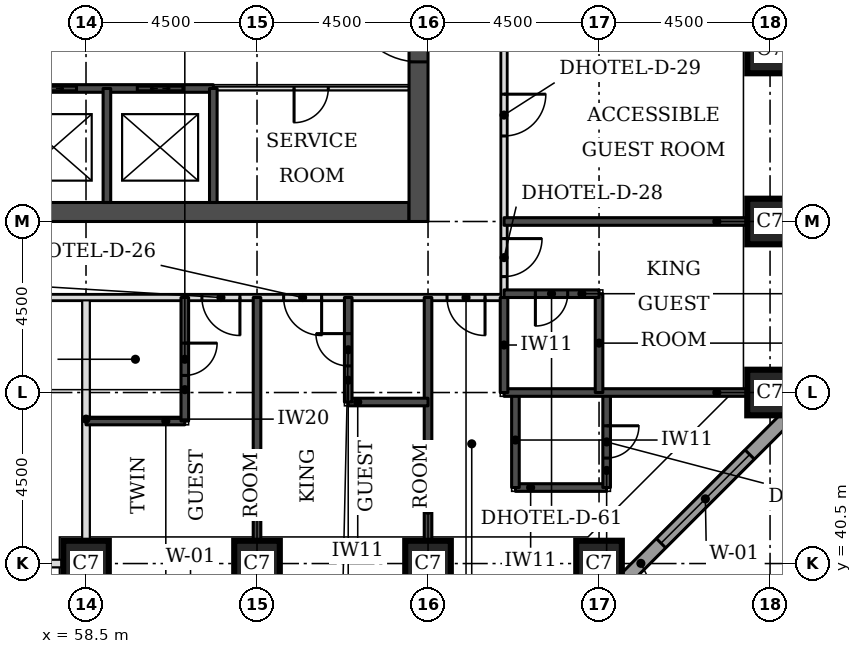
"""IFC4 building model, lengths in metres.
Left out: names, types, materials, properties, quantities, classifications, styles, units other than length and angle.
Written with IfcOpenShell. Run it as: python <this file> out.ifc"""

import sys

from ifc_helpers import new_model, si_unit, direction, frame, frame_2d, origin, origin_2d, place, context, subcontext, project, spatial, rectangle, extrude, element, fill, save


model = new_model("IFC4")
c1 = context("Model", 3, precision=1e-05, world=origin(), true_north=direction((0.0, 1.0)))
c2 = subcontext(c1, "Body", "Model", "MODEL_VIEW")
j1 = project(units=[si_unit("LENGTHUNIT", "METRE"), si_unit("PLANEANGLEUNIT", "RADIAN")], contexts=[c1])
p1 = place(None, origin())
s1 = spatial("IfcSite", under=j1, at=p1, CompositionType="ELEMENT")
p2 = place(p1, origin())
s2 = spatial("IfcBuilding", under=s1, at=p2, CompositionType="ELEMENT")
p3 = place(p2, frame((0.0, 0.0, 36.3)))
s3 = spatial("IfcBuildingStorey", under=s2, at=p3, CompositionType="ELEMENT", Elevation=36.3)
for number, where, z_axis, x_axis in (
    (1, (58.5, 40.5, 0.0), (0.0, 0.0, 1.0), (1.0, 0.0, 0.0)),
    (2, (63.0, 40.5, 0.0), (0.0, 0.0, 1.0), (1.0, 0.0, 0.0)),
    (3, (67.5, 40.5, 0.0), (0.0, 0.0, 1.0), (1.0, 0.0, 0.0)),
    (4, (72.0, 40.5, 0.0), (0.0, 0.0, 1.0), (1.0, 0.0, 0.0)),
    (5, (76.5, 45.0, 0.0), (0.0, 0.0, 1.0), (1.0, 0.0, 0.0)),
    (6, (76.5, 49.5, 0.0), (0.0, 0.0, 1.0), (1.0, 0.0, 0.0)),
    (7, (76.5, 54.0, 0.0), (0.0, 0.0, 1.0), (1.0, 0.0, 0.0)),
):
    element("IfcColumn", number, at=place(p3, frame(where, z_axis=z_axis, x_axis=x_axis)), inside=s3, PredefinedType="COLUMN", context=c2, shape_type="SweptSolid", body=[
        extrude(rectangle(XDim=1.2, YDim=1.2, at=origin_2d()), origin(), (0.0, 0.0, 1.0), 3.3),
    ])
p4 = place(p3, frame((45.5, 49.75, 0.0), z_axis=(0.0, 0.0, 1.0), x_axis=(1.0, 0.0, 0.0)))
e8 = element("IfcWall", 8, at=p4, inside=s3, PredefinedType="SHEAR", context=c2, shape_type="SweptSolid", body=[
    extrude(rectangle(XDim=21.5, YDim=0.5, at=frame_2d((10.75, 0.0))), origin(), (0.0, 0.0, 1.0), 3.3),
])
p5 = place(p3, frame((67.25, 49.5, 0.0), z_axis=(0.0, 0.0, 1.0), x_axis=(0.0, 1.0, 0.0)))
e9 = element("IfcWall", 9, at=p5, inside=s3, PredefinedType="SHEAR", context=c2, shape_type="SweptSolid", body=[
    extrude(rectangle(XDim=22.5, YDim=0.5, at=frame_2d((11.25, 0.0))), origin(), (0.0, 0.0, 1.0), 3.3),
])
p6 = place(p5, frame((4.2, 0.0, 0.0)))
e10 = element("IfcOpeningElement", 10, at=p6, cuts=e9, PredefinedType="OPENING", context=c2, shape_type="SweptSolid", body=[
    extrude(rectangle(XDim=1.8, YDim=2.1, at=frame_2d((0.9, 1.05))), frame((0.0, 0.26, 0.0), z_axis=(0.0, -1.0, 0.0), x_axis=(1.0, 0.0, 0.0)), (0.0, 0.0, 1.0), 0.52),
])
p7 = place(p5, frame((6.9, 0.0, 0.0)))
e11 = element("IfcOpeningElement", 11, at=p7, cuts=e9, PredefinedType="OPENING", context=c2, shape_type="SweptSolid", body=[
    extrude(rectangle(XDim=1.1, YDim=2.1, at=frame_2d((0.55, 1.05))), frame((0.0, 0.26, 0.0), z_axis=(0.0, -1.0, 0.0), x_axis=(1.0, 0.0, 0.0)), (0.0, 0.0, 1.0), 0.52),
])
p8 = place(p5, frame((13.6, 0.0, 0.0)))
e12 = element("IfcOpeningElement", 12, at=p8, cuts=e9, PredefinedType="OPENING", context=c2, shape_type="SweptSolid", body=[
    extrude(rectangle(XDim=1.1, YDim=2.1, at=frame_2d((0.55, 1.05))), frame((0.0, 0.26, 0.0), z_axis=(0.0, -1.0, 0.0), x_axis=(1.0, 0.0, 0.0)), (0.0, 0.0, 1.0), 0.52),
])
p9 = place(p5, frame((16.5, 0.0, 0.0)))
e13 = element("IfcOpeningElement", 13, at=p9, cuts=e9, PredefinedType="OPENING", context=c2, shape_type="SweptSolid", body=[
    extrude(rectangle(XDim=1.8, YDim=2.1, at=frame_2d((0.9, 1.05))), frame((0.0, 0.26, 0.0), z_axis=(0.0, -1.0, 0.0), x_axis=(1.0, 0.0, 0.0)), (0.0, 0.0, 1.0), 0.52),
])
p10 = place(p3, frame((72.27, 39.674, 0.0), z_axis=(0.0, 0.0, 1.0), x_axis=(0.707106781187, 0.707106781187, 0.0)))
e14 = element("IfcWall", 14, at=p10, inside=s3, PredefinedType="STANDARD", context=c2, shape_type="SweptSolid", body=[
    extrude(rectangle(XDim=7.151, YDim=0.35, at=frame_2d((3.576, 0.0))), origin(), (0.0, 0.0, 1.0), 3.055),
])
p11 = place(p10, frame((1.926, 0.0, 0.8)))
e15 = element("IfcOpeningElement", 15, at=p11, cuts=e14, PredefinedType="OPENING", context=c2, shape_type="SweptSolid", body=[
    extrude(rectangle(XDim=3.3, YDim=1.5, at=frame_2d((1.65, 0.75))), frame((0.0, 0.185, 0.0), z_axis=(0.0, -1.0, 0.0), x_axis=(1.0, 0.0, 0.0)), (0.0, 0.0, 1.0), 0.37),
])
p12 = place(p3, frame((51.5, 40.5, 0.0), z_axis=(0.0, 0.0, 1.0), x_axis=(1.0, 0.0, 0.0)))
e16 = element("IfcWall", 16, at=p12, inside=s3, PredefinedType="PARTITIONING", context=c2, shape_type="SweptSolid", body=[
    extrude(rectangle(XDim=6.4, YDim=0.2, at=frame_2d((3.2, 0.0))), origin(), (0.0, 0.0, 1.0), 2.33),
])
p13 = place(p3, frame((58.5, 41.1, 0.0), z_axis=(0.0, 0.0, 1.0), x_axis=(0.0, 1.0, 0.0)))
e17 = element("IfcWall", 17, at=p13, inside=s3, PredefinedType="PARTITIONING", context=c2, shape_type="SweptSolid", body=[
    extrude(rectangle(XDim=6.4, YDim=0.2, at=frame_2d((3.2, 0.0))), origin(), (0.0, 0.0, 1.0), 3.08),
])
p14 = place(p3, frame((51.5, 47.5, 0.0), z_axis=(0.0, 0.0, 1.0), x_axis=(1.0, 0.0, 0.0)))
e18 = element("IfcWall", 18, at=p14, inside=s3, PredefinedType="PARTITIONING", context=c2, shape_type="SweptSolid", body=[
    extrude(rectangle(XDim=18.0, YDim=0.15, at=frame_2d((9.0, 0.0))), origin(), (0.0, 0.0, 1.0), 3.08),
])
p15 = place(p14, frame((12.2, 0.0, 0.0)))
e19 = element("IfcOpeningElement", 19, at=p15, cuts=e18, PredefinedType="OPENING", context=c2, shape_type="SweptSolid", body=[
    extrude(rectangle(XDim=1.0, YDim=2.1, at=frame_2d((0.5, 1.05))), frame((0.0, 0.085, 0.0), z_axis=(0.0, -1.0, 0.0), x_axis=(1.0, 0.0, 0.0)), (0.0, 0.0, 1.0), 0.17),
])
p16 = place(p14, frame((10.05, 0.0, 0.0)))
e20 = element("IfcOpeningElement", 20, at=p16, cuts=e18, PredefinedType="OPENING", context=c2, shape_type="SweptSolid", body=[
    extrude(rectangle(XDim=1.0, YDim=2.1, at=frame_2d((0.5, 1.05))), frame((0.0, 0.085, 0.0), z_axis=(0.0, -1.0, 0.0), x_axis=(1.0, 0.0, 0.0)), (0.0, 0.0, 1.0), 0.17),
])
p17 = place(p14, frame((16.5, 0.0, 0.0)))
e21 = element("IfcOpeningElement", 21, at=p17, cuts=e18, PredefinedType="OPENING", context=c2, shape_type="SweptSolid", body=[
    extrude(rectangle(XDim=1.0, YDim=2.1, at=frame_2d((0.5, 1.05))), frame((0.0, 0.085, 0.0), z_axis=(0.0, -1.0, 0.0), x_axis=(1.0, 0.0, 0.0)), (0.0, 0.0, 1.0), 0.17),
])
p18 = place(p3, frame((69.5, 47.5, 0.0), z_axis=(0.0, 0.0, 1.0), x_axis=(0.0, 1.0, 0.0)))
e22 = element("IfcWall", 22, at=p18, inside=s3, PredefinedType="PARTITIONING", context=c2, shape_type="SweptSolid", body=[
    extrude(rectangle(XDim=26.5, YDim=0.15, at=frame_2d((13.25, 0.0))), origin(), (0.0, 0.0, 1.0), 3.08),
])
p19 = place(p18, frame((22.65, 0.0, 0.0)))
e23 = element("IfcOpeningElement", 23, at=p19, cuts=e22, PredefinedType="OPENING", context=c2, shape_type="SweptSolid", body=[
    extrude(rectangle(XDim=1.0, YDim=2.1, at=frame_2d((0.5, 1.05))), frame((0.0, 0.085, 0.0), z_axis=(0.0, -1.0, 0.0), x_axis=(1.0, 0.0, 0.0)), (0.0, 0.0, 1.0), 0.17),
])
p20 = place(p18, frame((16.6, 0.0, 0.0)))
e24 = element("IfcOpeningElement", 24, at=p20, cuts=e22, PredefinedType="OPENING", context=c2, shape_type="SweptSolid", body=[
    extrude(rectangle(XDim=1.0, YDim=2.1, at=frame_2d((0.5, 1.05))), frame((0.0, 0.085, 0.0), z_axis=(0.0, -1.0, 0.0), x_axis=(1.0, 0.0, 0.0)), (0.0, 0.0, 1.0), 0.17),
])
p21 = place(p18, frame((4.25, 0.0, 0.0)))
e25 = element("IfcOpeningElement", 25, at=p21, cuts=e22, PredefinedType="OPENING", context=c2, shape_type="SweptSolid", body=[
    extrude(rectangle(XDim=1.1, YDim=2.1, at=frame_2d((0.55, 1.05))), frame((0.0, 0.085, 0.0), z_axis=(0.0, -1.0, 0.0), x_axis=(1.0, 0.0, 0.0)), (0.0, 0.0, 1.0), 0.17),
])
p22 = place(p18, frame((0.55, 0.0, 0.0)))
e26 = element("IfcOpeningElement", 26, at=p22, cuts=e22, PredefinedType="OPENING", context=c2, shape_type="SweptSolid", body=[
    extrude(rectangle(XDim=1.0, YDim=2.1, at=frame_2d((0.5, 1.05))), frame((0.0, 0.085, 0.0), z_axis=(0.0, -1.0, 0.0), x_axis=(1.0, 0.0, 0.0)), (0.0, 0.0, 1.0), 0.17),
])
for number, where, z_axis, x_axis in (
    (27, (63.0, 41.1, 0.0), (0.0, 0.0, 1.0), (0.0, 1.0, 0.0)),
    (28, (67.5, 41.1, 0.0), (0.0, 0.0, 1.0), (0.0, 1.0, 0.0)),
):
    element("IfcWall", number, at=place(p3, frame(where, z_axis=z_axis, x_axis=x_axis)), inside=s3, PredefinedType="SOLIDWALL", context=c2, shape_type="SweptSolid", body=[
        extrude(rectangle(XDim=6.4, YDim=0.2, at=frame_2d((3.2, 0.0))), origin(), (0.0, 0.0, 1.0), 3.08),
    ])
p23 = place(p3, frame((69.8, 42.5, 0.0), z_axis=(0.0, 0.0, 1.0), x_axis=(1.0, 0.0, 0.0)))
e29 = element("IfcWall", 29, at=p23, inside=s3, PredefinedType="SOLIDWALL", context=c2, shape_type="SweptSolid", body=[
    extrude(rectangle(XDim=2.4, YDim=0.2, at=frame_2d((1.2, 0.0))), origin(), (0.0, 0.0, 1.0), 3.08),
])
p24 = place(p3, frame((69.8, 42.5, 0.0), z_axis=(0.0, 0.0, 1.0), x_axis=(0.0, 1.0, 0.0)))
e30 = element("IfcWall", 30, at=p24, inside=s3, PredefinedType="SOLIDWALL", context=c2, shape_type="SweptSolid", body=[
    extrude(rectangle(XDim=2.5, YDim=0.2, at=frame_2d((1.25, 0.0))), origin(), (0.0, 0.0, 1.0), 3.08),
])
p25 = place(p3, frame((72.2, 42.5, 0.0), z_axis=(0.0, 0.0, 1.0), x_axis=(0.0, 1.0, 0.0)))
e31 = element("IfcWall", 31, at=p25, inside=s3, PredefinedType="SOLIDWALL", context=c2, shape_type="SweptSolid", body=[
    extrude(rectangle(XDim=2.5, YDim=0.2, at=frame_2d((1.25, 0.0))), origin(), (0.0, 0.0, 1.0), 3.08),
])
p26 = place(p25, frame((0.775, 0.0, 0.0)))
e32 = element("IfcOpeningElement", 32, at=p26, cuts=e31, PredefinedType="OPENING", context=c2, shape_type="SweptSolid", body=[
    extrude(rectangle(XDim=0.85, YDim=2.1, at=frame_2d((0.425, 1.05))), frame((0.0, 0.11, 0.0), z_axis=(0.0, -1.0, 0.0), x_axis=(1.0, 0.0, 0.0)), (0.0, 0.0, 1.0), 0.22),
])
p27 = place(p3, frame((58.5, 44.25, 0.0), z_axis=(0.0, 0.0, 1.0), x_axis=(1.0, 0.0, 0.0)))
e33 = element("IfcWall", 33, at=p27, inside=s3, PredefinedType="SOLIDWALL", context=c2, shape_type="SweptSolid", body=[
    extrude(rectangle(XDim=2.6, YDim=0.2, at=frame_2d((1.3, 0.0))), origin(), (0.0, 0.0, 1.0), 3.08),
])
p28 = place(p3, frame((61.1, 44.25, 0.0), z_axis=(0.0, 0.0, 1.0), x_axis=(0.0, 1.0, 0.0)))
e34 = element("IfcWall", 34, at=p28, inside=s3, PredefinedType="SOLIDWALL", context=c2, shape_type="SweptSolid", body=[
    extrude(rectangle(XDim=3.25, YDim=0.2, at=frame_2d((1.625, 0.0))), origin(), (0.0, 0.0, 1.0), 3.08),
])
p29 = place(p28, frame((1.2, 0.0, 0.0)))
e35 = element("IfcOpeningElement", 35, at=p29, cuts=e34, PredefinedType="OPENING", context=c2, shape_type="SweptSolid", body=[
    extrude(rectangle(XDim=0.85, YDim=2.1, at=frame_2d((0.425, 1.05))), frame((0.0, 0.11, 0.0), z_axis=(0.0, -1.0, 0.0), x_axis=(1.0, 0.0, 0.0)), (0.0, 0.0, 1.0), 0.22),
])
p30 = place(p3, frame((65.4, 44.75, 0.0), z_axis=(0.0, 0.0, 1.0), x_axis=(1.0, 0.0, 0.0)))
e36 = element("IfcWall", 36, at=p30, inside=s3, PredefinedType="SOLIDWALL", context=c2, shape_type="SweptSolid", body=[
    extrude(rectangle(XDim=2.1, YDim=0.2, at=frame_2d((1.05, 0.0))), origin(), (0.0, 0.0, 1.0), 3.08),
])
p31 = place(p3, frame((65.4, 44.75, 0.0), z_axis=(0.0, 0.0, 1.0), x_axis=(0.0, 1.0, 0.0)))
e37 = element("IfcWall", 37, at=p31, inside=s3, PredefinedType="SOLIDWALL", context=c2, shape_type="SweptSolid", body=[
    extrude(rectangle(XDim=2.75, YDim=0.2, at=frame_2d((1.375, 0.0))), origin(), (0.0, 0.0, 1.0), 3.08),
])
p32 = place(p31, frame((0.95, 0.0, 0.0)))
e38 = element("IfcOpeningElement", 38, at=p32, cuts=e37, PredefinedType="OPENING", context=c2, shape_type="SweptSolid", body=[
    extrude(rectangle(XDim=0.85, YDim=2.1, at=frame_2d((0.425, 1.05))), frame((0.0, 0.11, 0.0), z_axis=(0.0, -1.0, 0.0), x_axis=(1.0, 0.0, 0.0)), (0.0, 0.0, 1.0), 0.22),
])
p33 = place(p3, frame((69.5, 45.0, 0.0), z_axis=(0.0, 0.0, 1.0), x_axis=(1.0, 0.0, 0.0)))
e39 = element("IfcWall", 39, at=p33, inside=s3, PredefinedType="SOLIDWALL", context=c2, shape_type="SweptSolid", body=[
    extrude(rectangle(XDim=6.4, YDim=0.2, at=frame_2d((3.2, 0.0))), origin(), (0.0, 0.0, 1.0), 3.08),
])
p34 = place(p3, frame((69.5, 45.0, 0.0), z_axis=(0.0, 0.0, 1.0), x_axis=(0.0, 1.0, 0.0)))
e40 = element("IfcWall", 40, at=p34, inside=s3, PredefinedType="SOLIDWALL", context=c2, shape_type="SweptSolid", body=[
    extrude(rectangle(XDim=2.5, YDim=0.2, at=frame_2d((1.25, 0.0))), origin(), (0.0, 0.0, 1.0), 3.08),
])
p35 = place(p3, frame((72.0, 45.0, 0.0), z_axis=(0.0, 0.0, 1.0), x_axis=(0.0, 1.0, 0.0)))
e41 = element("IfcWall", 41, at=p35, inside=s3, PredefinedType="SOLIDWALL", context=c2, shape_type="SweptSolid", body=[
    extrude(rectangle(XDim=2.6, YDim=0.2, at=frame_2d((1.3, 0.0))), origin(), (0.0, 0.0, 1.0), 3.08),
])
p36 = place(p3, frame((69.5, 47.6, 0.0), z_axis=(0.0, 0.0, 1.0), x_axis=(1.0, 0.0, 0.0)))
e42 = element("IfcWall", 42, at=p36, inside=s3, PredefinedType="SOLIDWALL", context=c2, shape_type="SweptSolid", body=[
    extrude(rectangle(XDim=2.5, YDim=0.2, at=frame_2d((1.25, 0.0))), origin(), (0.0, 0.0, 1.0), 3.08),
])
p37 = place(p36, frame((0.825, 0.0, 0.0)))
e43 = element("IfcOpeningElement", 43, at=p37, cuts=e42, PredefinedType="OPENING", context=c2, shape_type="SweptSolid", body=[
    extrude(rectangle(XDim=0.85, YDim=2.1, at=frame_2d((0.425, 1.05))), frame((0.0, 0.11, 0.0), z_axis=(0.0, -1.0, 0.0), x_axis=(1.0, 0.0, 0.0)), (0.0, 0.0, 1.0), 0.22),
])
p38 = place(p3, frame((69.5, 49.5, 0.0), z_axis=(0.0, 0.0, 1.0), x_axis=(1.0, 0.0, 0.0)))
e44 = element("IfcWall", 44, at=p38, inside=s3, PredefinedType="SOLIDWALL", context=c2, shape_type="SweptSolid", body=[
    extrude(rectangle(XDim=6.4, YDim=0.2, at=frame_2d((3.2, 0.0))), origin(), (0.0, 0.0, 1.0), 3.08),
])
p39 = place(p3, frame((61.85, 53.0, 0.0), z_axis=(0.0, 0.0, 1.0), x_axis=(1.0, 0.0, 0.0)))
e45 = element("IfcWall", 45, at=p39, inside=s3, PredefinedType="PARTITIONING", context=c2, shape_type="SweptSolid", body=[
    extrude(rectangle(XDim=5.15, YDim=0.1, at=frame_2d((2.575, 0.0))), origin(), (0.0, 0.0, 1.0), 3.08),
])
p40 = place(p39, frame((2.125, 0.0, 0.0)))
e46 = element("IfcOpeningElement", 46, at=p40, cuts=e45, PredefinedType="OPENING", context=c2, shape_type="SweptSolid", body=[
    extrude(rectangle(XDim=0.9, YDim=2.1, at=frame_2d((0.45, 1.05))), frame((0.0, 0.06, 0.0), z_axis=(0.0, -1.0, 0.0), x_axis=(1.0, 0.0, 0.0)), (0.0, 0.0, 1.0), 0.12),
])
p41 = place(p3, frame((50.65, 53.0, 0.0), z_axis=(0.0, 0.0, 1.0), x_axis=(1.0, 0.0, 0.0)))
e47 = element("IfcWall", 47, at=p41, inside=s3, PredefinedType="SOLIDWALL", context=c2, shape_type="SweptSolid", body=[
    extrude(rectangle(XDim=11.2, YDim=0.2, at=frame_2d((5.6, 0.0))), origin(), (0.0, 0.0, 1.0), 3.08),
])
p42 = place(p41, frame((0.8, 0.0, 0.0)))
e48 = element("IfcOpeningElement", 48, at=p42, cuts=e47, PredefinedType="OPENING", context=c2, shape_type="SweptSolid", body=[
    extrude(rectangle(XDim=1.2, YDim=2.1, at=frame_2d((0.6, 1.05))), frame((0.0, 0.11, 0.0), z_axis=(0.0, -1.0, 0.0), x_axis=(1.0, 0.0, 0.0)), (0.0, 0.0, 1.0), 0.22),
])
p43 = place(p41, frame((3.6, 0.0, 0.0)))
e49 = element("IfcOpeningElement", 49, at=p43, cuts=e47, PredefinedType="OPENING", context=c2, shape_type="SweptSolid", body=[
    extrude(rectangle(XDim=1.2, YDim=2.1, at=frame_2d((0.6, 1.05))), frame((0.0, 0.11, 0.0), z_axis=(0.0, -1.0, 0.0), x_axis=(1.0, 0.0, 0.0)), (0.0, 0.0, 1.0), 0.22),
])
p44 = place(p41, frame((6.4, 0.0, 0.0)))
e50 = element("IfcOpeningElement", 50, at=p44, cuts=e47, PredefinedType="OPENING", context=c2, shape_type="SweptSolid", body=[
    extrude(rectangle(XDim=1.2, YDim=2.1, at=frame_2d((0.6, 1.05))), frame((0.0, 0.11, 0.0), z_axis=(0.0, -1.0, 0.0), x_axis=(1.0, 0.0, 0.0)), (0.0, 0.0, 1.0), 0.22),
])
p45 = place(p41, frame((9.2, 0.0, 0.0)))
e51 = element("IfcOpeningElement", 51, at=p45, cuts=e47, PredefinedType="OPENING", context=c2, shape_type="SweptSolid", body=[
    extrude(rectangle(XDim=1.2, YDim=2.1, at=frame_2d((0.6, 1.05))), frame((0.0, 0.11, 0.0), z_axis=(0.0, -1.0, 0.0), x_axis=(1.0, 0.0, 0.0)), (0.0, 0.0, 1.0), 0.22),
])
for number, where, z_axis, x_axis in (
    (52, (59.05, 50.0, 0.0), (0.0, 0.0, 1.0), (0.0, 1.0, 0.0)),
    (53, (61.85, 50.0, 0.0), (0.0, 0.0, 1.0), (0.0, 1.0, 0.0)),
):
    element("IfcWall", number, at=place(p3, frame(where, z_axis=z_axis, x_axis=x_axis)), inside=s3, PredefinedType="SOLIDWALL", context=c2, shape_type="SweptSolid", body=[
        extrude(rectangle(XDim=3.0, YDim=0.2, at=frame_2d((1.5, 0.0))), origin(), (0.0, 0.0, 1.0), 3.08),
    ])
p46 = place(p11, origin())
e54 = element("IfcWindow", 54, at=p46, inside=s3, PartitioningType="SINGLE_PANEL", PredefinedType="WINDOW", context=c2, shape_type="SweptSolid", body=[
    extrude(rectangle(XDim=3.3, YDim=1.5, at=frame_2d((1.65, 0.75))), frame((0.0, 0.085, 0.0), z_axis=(0.0, -1.0, 0.0), x_axis=(1.0, 0.0, 0.0)), (0.0, 0.0, 1.0), 0.06),
])
fill(e15, e54)
p47 = place(p21, frame((1.1, 0.0, 0.0), z_axis=(0.0, 0.0, 1.0), x_axis=(-1.0, 0.0, 0.0)))
e55 = element("IfcDoor", 55, at=p47, inside=s3, OperationType="SINGLE_SWING_LEFT", PredefinedType="DOOR", context=c2, shape_type="SweptSolid", body=[
    extrude(rectangle(XDim=1.1, YDim=2.1, at=frame_2d((0.55, 1.05))), frame((0.0, 0.025, 0.0), z_axis=(0.0, -1.0, 0.0), x_axis=(1.0, 0.0, 0.0)), (0.0, 0.0, 1.0), 0.05),
])
fill(e25, e55)
p48 = place(p22, frame((1.0, 0.0, 0.0), z_axis=(0.0, 0.0, 1.0), x_axis=(-1.0, 0.0, 0.0)))
e56 = element("IfcDoor", 56, at=p48, inside=s3, OperationType="SINGLE_SWING_LEFT", PredefinedType="DOOR", context=c2, shape_type="SweptSolid", body=[
    extrude(rectangle(XDim=1.0, YDim=2.1, at=frame_2d((0.5, 1.05))), frame((0.0, 0.025, 0.0), z_axis=(0.0, -1.0, 0.0), x_axis=(1.0, 0.0, 0.0)), (0.0, 0.0, 1.0), 0.05),
])
fill(e26, e56)
p49 = place(p37, frame((0.85, 0.0, 0.0), z_axis=(0.0, 0.0, 1.0), x_axis=(-1.0, 0.0, 0.0)))
e57 = element("IfcDoor", 57, at=p49, inside=s3, OperationType="SINGLE_SWING_RIGHT", PredefinedType="DOOR", context=c2, shape_type="SweptSolid", body=[
    extrude(rectangle(XDim=0.85, YDim=2.1, at=frame_2d((0.425, 1.05))), frame((0.0, 0.025, 0.0), z_axis=(0.0, -1.0, 0.0), x_axis=(1.0, 0.0, 0.0)), (0.0, 0.0, 1.0), 0.05),
])
fill(e43, e57)
p50 = place(p15, frame((1.0, 0.0, 0.0), z_axis=(0.0, 0.0, 1.0), x_axis=(-1.0, 0.0, 0.0)))
e58 = element("IfcDoor", 58, at=p50, inside=s3, OperationType="SINGLE_SWING_LEFT", PredefinedType="DOOR", context=c2, shape_type="SweptSolid", body=[
    extrude(rectangle(XDim=1.0, YDim=2.1, at=frame_2d((0.5, 1.05))), frame((0.0, 0.025, 0.0), z_axis=(0.0, -1.0, 0.0), x_axis=(1.0, 0.0, 0.0)), (0.0, 0.0, 1.0), 0.05),
])
fill(e19, e58)
p51 = place(p32, origin())
e59 = element("IfcDoor", 59, at=p51, inside=s3, OperationType="SINGLE_SWING_RIGHT", PredefinedType="DOOR", context=c2, shape_type="SweptSolid", body=[
    extrude(rectangle(XDim=0.85, YDim=2.1, at=frame_2d((0.425, 1.05))), frame((0.0, 0.025, 0.0), z_axis=(0.0, -1.0, 0.0), x_axis=(1.0, 0.0, 0.0)), (0.0, 0.0, 1.0), 0.05),
])
fill(e38, e59)
p52 = place(p16, frame((1.0, 0.0, 0.0), z_axis=(0.0, 0.0, 1.0), x_axis=(-1.0, 0.0, 0.0)))
e60 = element("IfcDoor", 60, at=p52, inside=s3, OperationType="SINGLE_SWING_LEFT", PredefinedType="DOOR", context=c2, shape_type="SweptSolid", body=[
    extrude(rectangle(XDim=1.0, YDim=2.1, at=frame_2d((0.5, 1.05))), frame((0.0, 0.025, 0.0), z_axis=(0.0, -1.0, 0.0), x_axis=(1.0, 0.0, 0.0)), (0.0, 0.0, 1.0), 0.05),
])
fill(e20, e60)
p53 = place(p29, frame((0.85, 0.0, 0.0), z_axis=(0.0, 0.0, 1.0), x_axis=(-1.0, 0.0, 0.0)))
e61 = element("IfcDoor", 61, at=p53, inside=s3, OperationType="SINGLE_SWING_LEFT", PredefinedType="DOOR", context=c2, shape_type="SweptSolid", body=[
    extrude(rectangle(XDim=0.85, YDim=2.1, at=frame_2d((0.425, 1.05))), frame((0.0, 0.025, 0.0), z_axis=(0.0, -1.0, 0.0), x_axis=(1.0, 0.0, 0.0)), (0.0, 0.0, 1.0), 0.05),
])
fill(e35, e61)
p54 = place(p17, frame((1.0, 0.0, 0.0), z_axis=(0.0, 0.0, 1.0), x_axis=(-1.0, 0.0, 0.0)))
e62 = element("IfcDoor", 62, at=p54, inside=s3, OperationType="SINGLE_SWING_LEFT", PredefinedType="DOOR", context=c2, shape_type="SweptSolid", body=[
    extrude(rectangle(XDim=1.0, YDim=2.1, at=frame_2d((0.5, 1.05))), frame((0.0, 0.025, 0.0), z_axis=(0.0, -1.0, 0.0), x_axis=(1.0, 0.0, 0.0)), (0.0, 0.0, 1.0), 0.05),
])
fill(e21, e62)
p55 = place(p26, frame((0.85, 0.0, 0.0), z_axis=(0.0, 0.0, 1.0), x_axis=(-1.0, 0.0, 0.0)))
e63 = element("IfcDoor", 63, at=p55, inside=s3, OperationType="SINGLE_SWING_LEFT", PredefinedType="DOOR", context=c2, shape_type="SweptSolid", body=[
    extrude(rectangle(XDim=0.85, YDim=2.1, at=frame_2d((0.425, 1.05))), frame((0.0, 0.025, 0.0), z_axis=(0.0, -1.0, 0.0), x_axis=(1.0, 0.0, 0.0)), (0.0, 0.0, 1.0), 0.05),
])
fill(e32, e63)
p56 = place(p44, origin())
e64 = element("IfcDoor", 64, at=p56, inside=s3, OperationType="DOUBLE_DOOR_SLIDING", PredefinedType="DOOR", context=c2, shape_type="SweptSolid", body=[
    extrude(rectangle(XDim=1.2, YDim=2.1, at=frame_2d((0.6, 1.05))), frame((0.0, 0.025, 0.0), z_axis=(0.0, -1.0, 0.0), x_axis=(1.0, 0.0, 0.0)), (0.0, 0.0, 1.0), 0.05),
])
fill(e50, e64)
p57 = place(p45, origin())
e65 = element("IfcDoor", 65, at=p57, inside=s3, OperationType="DOUBLE_DOOR_SLIDING", PredefinedType="DOOR", context=c2, shape_type="SweptSolid", body=[
    extrude(rectangle(XDim=1.2, YDim=2.1, at=frame_2d((0.6, 1.05))), frame((0.0, 0.025, 0.0), z_axis=(0.0, -1.0, 0.0), x_axis=(1.0, 0.0, 0.0)), (0.0, 0.0, 1.0), 0.05),
])
fill(e51, e65)
p58 = place(p6, origin())
e66 = element("IfcDoor", 66, at=p58, inside=s3, OperationType="SINGLE_SWING_RIGHT", PredefinedType="DOOR", context=c2, shape_type="SweptSolid", body=[
    extrude(rectangle(XDim=1.8, YDim=2.1, at=frame_2d((0.9, 1.05))), frame((0.0, 0.025, 0.0), z_axis=(0.0, -1.0, 0.0), x_axis=(1.0, 0.0, 0.0)), (0.0, 0.0, 1.0), 0.05),
])
fill(e10, e66)
p59 = place(p40, frame((0.9, 0.0, 0.0), z_axis=(0.0, 0.0, 1.0), x_axis=(-1.0, 0.0, 0.0)))
e67 = element("IfcDoor", 67, at=p59, inside=s3, OperationType="SINGLE_SWING_RIGHT", PredefinedType="DOOR", context=c2, shape_type="SweptSolid", body=[
    extrude(rectangle(XDim=0.9, YDim=2.1, at=frame_2d((0.45, 1.05))), frame((0.0, 0.025, 0.0), z_axis=(0.0, -1.0, 0.0), x_axis=(1.0, 0.0, 0.0)), (0.0, 0.0, 1.0), 0.05),
])
fill(e46, e67)
save(model, sys.argv[1])
